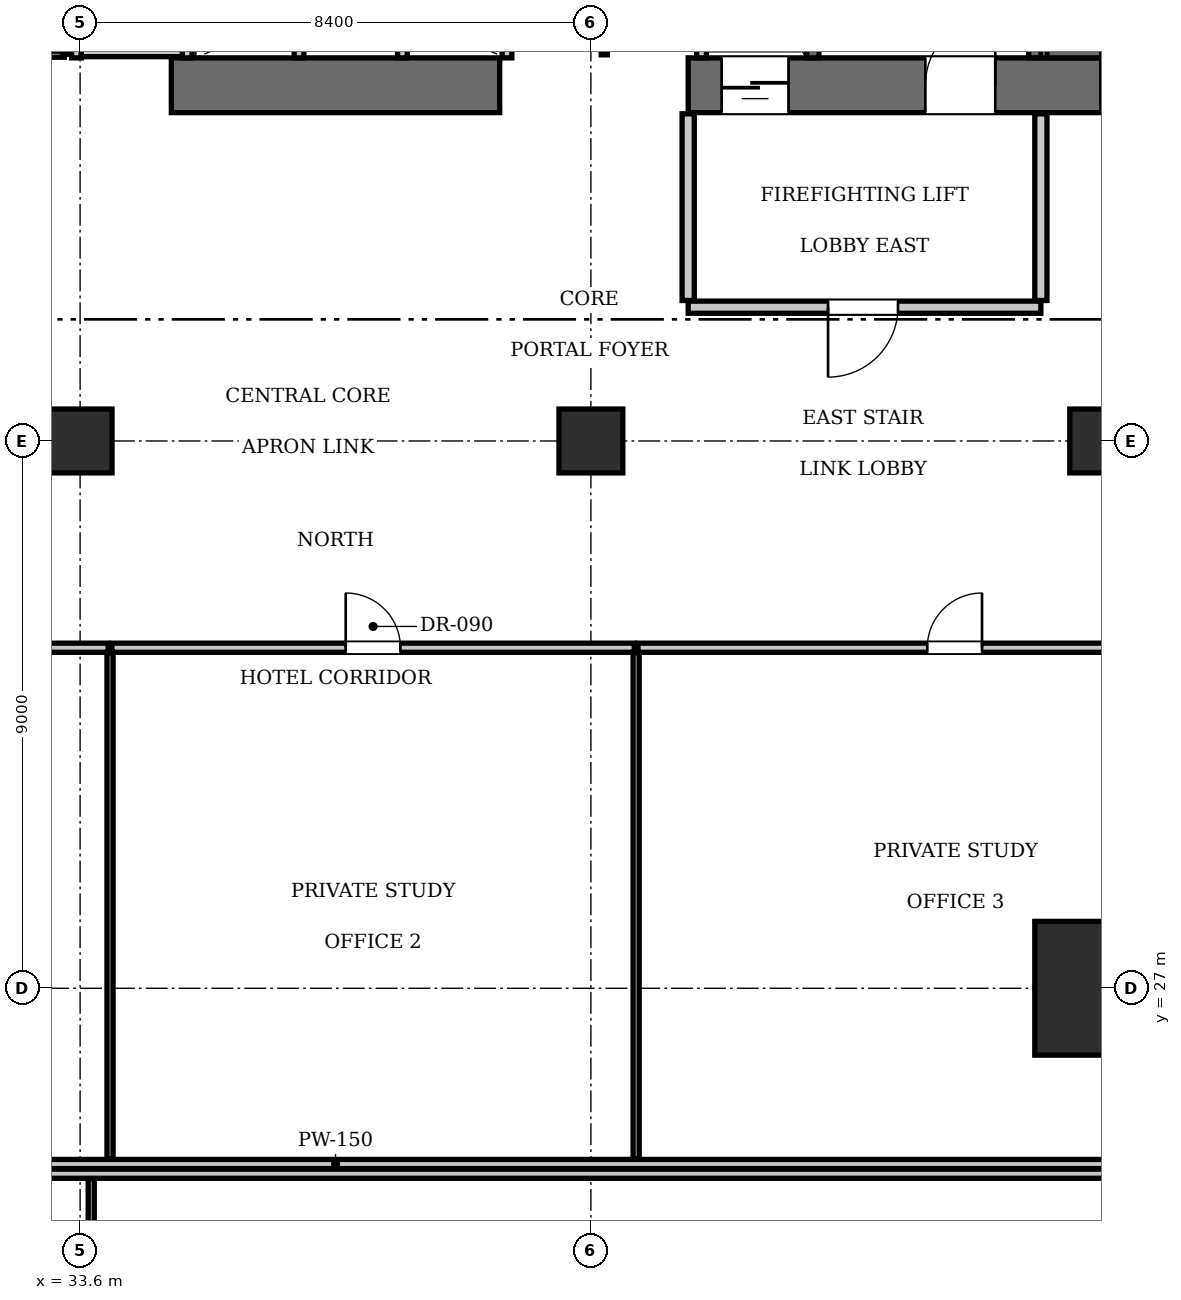
"""IFC4 building model, lengths in metres.
Left out: names, types, materials, properties, quantities, classifications, styles, units other than length and angle.
Written with IfcOpenShell. Run it as: python <this file> out.ifc"""

import sys

from ifc_helpers import new_model, si_unit, direction, frame, frame_2d, origin, origin_2d, place, context, subcontext, project, spatial, rectangle, extrude, element, fill, save


model = new_model("IFC4")
c1 = context("Model", 3, precision=1e-05, world=origin(), true_north=direction((0.0, 1.0)))
c2 = subcontext(c1, "Body", "Model", "MODEL_VIEW")
j1 = project(units=[si_unit("LENGTHUNIT", "METRE"), si_unit("PLANEANGLEUNIT", "RADIAN")], contexts=[c1])
p1 = place(None, origin())
s1 = spatial("IfcSite", under=j1, at=p1, CompositionType="ELEMENT")
p2 = place(p1, origin())
s2 = spatial("IfcBuilding", under=s1, at=p2, CompositionType="ELEMENT")
p3 = place(p2, frame((0.0, 0.0, 69.3)))
s3 = spatial("IfcBuildingStorey", under=s2, at=p3, CompositionType="ELEMENT", Elevation=69.3)
p4 = place(p3, frame((50.4, 27.0, 0.0), z_axis=(0.0, 0.0, 1.0), x_axis=(1.0, 0.0, 0.0)))
e1 = element("IfcColumn", 1, at=p4, inside=s3, PredefinedType="COLUMN", context=c2, shape_type="SweptSolid", body=[
    extrude(rectangle(XDim=2.2, YDim=2.2, at=origin_2d()), origin(), (0.0, 0.0, 1.0), 3.85),
])
p5 = place(p3, frame((35.1, 41.85, 0.0), z_axis=(0.0, 0.0, 1.0), x_axis=(1.0, 0.0, 0.0)))
e2 = element("IfcWall", 2, at=p5, inside=s3, PredefinedType="SHEAR", context=c2, shape_type="SweptSolid", body=[
    extrude(rectangle(XDim=5.4, YDim=0.9, at=frame_2d((2.7, 0.0))), origin(), (0.0, 0.0, 1.0), 3.85),
])
p6 = place(p3, frame((43.6, 41.85, 0.0), z_axis=(0.0, 0.0, 1.0), x_axis=(1.0, 0.0, 0.0)))
e3 = element("IfcWall", 3, at=p6, inside=s3, PredefinedType="SHEAR", context=c2, shape_type="SweptSolid", body=[
    extrude(rectangle(XDim=6.8, YDim=0.9, at=frame_2d((3.4, 0.0))), origin(), (0.0, 0.0, 1.0), 3.85),
])
p7 = place(p6, frame((3.9, 0.0, 0.0)))
e4 = element("IfcOpeningElement", 4, at=p7, cuts=e3, PredefinedType="OPENING", context=c2, shape_type="SweptSolid", body=[
    extrude(rectangle(XDim=1.15, YDim=2.15, at=frame_2d((0.575, 1.075))), frame((0.0, 0.46, 0.0), z_axis=(0.0, -1.0, 0.0), x_axis=(1.0, 0.0, 0.0)), (0.0, 0.0, 1.0), 0.92),
])
p8 = place(p6, frame((0.55, 0.0, 0.0)))
e5 = element("IfcOpeningElement", 5, at=p8, cuts=e3, PredefinedType="OPENING", context=c2, shape_type="SweptSolid", body=[
    extrude(rectangle(XDim=1.1, YDim=2.2, at=frame_2d((0.55, 1.1))), frame((0.0, 0.46, 0.0), z_axis=(0.0, -1.0, 0.0), x_axis=(1.0, 0.0, 0.0)), (0.0, 0.0, 1.0), 0.92),
])
p9 = place(p3, frame((49.95, 42.3, 0.0), z_axis=(0.0, 0.0, 1.0), x_axis=(0.0, 1.0, 0.0)))
e6 = element("IfcWall", 6, at=p9, inside=s3, PredefinedType="SHEAR", context=c2, shape_type="SweptSolid", body=[
    extrude(rectangle(XDim=1.6, YDim=0.9, at=frame_2d((0.8, 0.0))), origin(), (0.0, 0.0, 1.0), 3.85),
])
for number, where, z_axis, x_axis in (
    (7, (33.6, 36.0, 0.0), (0.0, 0.0, 1.0), (1.0, 0.0, 0.0)),
    (8, (42.0, 36.0, 0.0), (0.0, 0.0, 1.0), (1.0, 0.0, 0.0)),
    (9, (50.4, 36.0, 0.0), (0.0, 0.0, 1.0), (1.0, 0.0, 0.0)),
):
    element("IfcColumn", number, at=place(p3, frame(where, z_axis=z_axis, x_axis=x_axis)), inside=s3, PredefinedType="COLUMN", context=c2, shape_type="SweptSolid", body=[
        extrude(rectangle(XDim=1.05, YDim=1.05, at=origin_2d()), origin(), (0.0, 0.0, 1.0), 3.85),
    ])
p10 = place(p3, frame((45.65, 42.3, 0.0), z_axis=(0.0, 0.0, 1.0), x_axis=(0.0, 1.0, 0.0)))
e10 = element("IfcWall", 10, at=p10, inside=s3, PredefinedType="SOLIDWALL", context=c2, shape_type="SweptSolid", body=[
    extrude(rectangle(XDim=8.85, YDim=0.2, at=frame_2d((4.425, 0.0))), origin(), (0.0, 0.0, 1.0), 3.61),
])
p11 = place(p3, frame((49.3, 42.3, 0.0), z_axis=(0.0, 0.0, 1.0), x_axis=(0.0, 1.0, 0.0)))
e11 = element("IfcWall", 11, at=p11, inside=s3, PredefinedType="SOLIDWALL", context=c2, shape_type="SweptSolid", body=[
    extrude(rectangle(XDim=1.58, YDim=0.2, at=frame_2d((0.79, 0.0))), origin(), (0.0, 0.0, 1.0), 3.61),
])
p12 = place(p3, frame((43.82, 42.3, 0.0), z_axis=(0.0, 0.0, 1.0), x_axis=(0.0, 1.0, 0.0)))
e12 = element("IfcWall", 12, at=p12, inside=s3, PredefinedType="SOLIDWALL", context=c2, shape_type="SweptSolid", body=[
    extrude(rectangle(XDim=2.44, YDim=0.16, at=frame_2d((1.22, 0.0))), origin(), (0.0, 0.0, 1.0), 3.61),
])
for number, where, z_axis, x_axis in (
    (13, (37.2, 42.3, 0.0), (0.0, 0.0, 1.0), (0.0, 1.0, 0.0)),
    (14, (38.9, 42.3, 0.0), (0.0, 0.0, 1.0), (0.0, 1.0, 0.0)),
    (15, (40.62, 42.3, 0.0), (0.0, 0.0, 1.0), (0.0, 1.0, 0.0)),
):
    element("IfcWall", number, at=place(p3, frame(where, z_axis=z_axis, x_axis=x_axis)), inside=s3, PredefinedType="SOLIDWALL", context=c2, shape_type="SweptSolid", body=[
        extrude(rectangle(XDim=2.05, YDim=0.16, at=frame_2d((1.025, 0.0))), origin(), (0.0, 0.0, 1.0), 3.61),
    ])
for number, where, z_axis, x_axis in (
    (16, (33.54, 42.3, 0.0), (0.0, 0.0, 1.0), (0.0, 1.0, 0.0)),
    (17, (35.36, 42.3, 0.0), (0.0, 0.0, 1.0), (0.0, 1.0, 0.0)),
):
    element("IfcWall", number, at=place(p3, frame(where, z_axis=z_axis, x_axis=x_axis)), inside=s3, PredefinedType="SOLIDWALL", context=c2, shape_type="SweptSolid", body=[
        extrude(rectangle(XDim=2.1, YDim=0.16, at=frame_2d((1.05, 0.0))), origin(), (0.0, 0.0, 1.0), 3.61),
    ])
p13 = place(p3, frame((33.62, 42.4, 0.0), z_axis=(0.0, 0.0, 1.0), x_axis=(1.0, 0.0, 0.0)))
e18 = element("IfcWall", 18, at=p13, inside=s3, PredefinedType="SOLIDWALL", context=c2, shape_type="SweptSolid", body=[
    extrude(rectangle(XDim=1.66, YDim=0.16, at=frame_2d((0.83, 0.0))), origin(), (0.0, 0.0, 1.0), 3.61),
])
p14 = place(p3, frame((43.6, 38.2, 0.0), z_axis=(0.0, 0.0, 1.0), x_axis=(1.0, 0.0, 0.0)))
e19 = element("IfcWall", 19, at=p14, inside=s3, PredefinedType="PARTITIONING", context=c2, shape_type="SweptSolid", body=[
    extrude(rectangle(XDim=5.8, YDim=0.2, at=frame_2d((2.9, 0.0))), origin(), (0.0, 0.0, 1.0), 3.61),
])
p15 = place(p14, frame((2.3, 0.0, 0.0)))
e20 = element("IfcOpeningElement", 20, at=p15, cuts=e19, PredefinedType="OPENING", context=c2, shape_type="SweptSolid", body=[
    extrude(rectangle(XDim=1.15, YDim=2.15, at=frame_2d((0.575, 1.075))), frame((0.0, 0.11, 0.0), z_axis=(0.0, -1.0, 0.0), x_axis=(1.0, 0.0, 0.0)), (0.0, 0.0, 1.0), 0.22),
])
for number, where, z_axis, x_axis in (
    (21, (43.6, 38.31, 0.0), (0.0, 0.0, 1.0), (0.0, 1.0, 0.0)),
    (22, (49.4, 38.31, 0.0), (0.0, 0.0, 1.0), (0.0, 1.0, 0.0)),
):
    element("IfcWall", number, at=place(p3, frame(where, z_axis=z_axis, x_axis=x_axis)), inside=s3, PredefinedType="PARTITIONING", context=c2, shape_type="SweptSolid", body=[
        extrude(rectangle(XDim=3.07, YDim=0.2, at=frame_2d((1.535, 0.0))), origin(), (0.0, 0.0, 1.0), 3.61),
    ])
p16 = place(p3, frame((32.02, 42.36, 0.0), z_axis=(0.0, 0.0, 1.0), x_axis=(1.0, 0.0, 0.0)))
e23 = element("IfcWall", 23, at=p16, inside=s3, PredefinedType="PARTITIONING", context=c2, shape_type="SweptSolid", body=[
    extrude(rectangle(XDim=1.32, YDim=0.1, at=frame_2d((0.66, 0.0))), origin(), (0.0, 0.0, 1.0), 3.61),
])
p17 = place(p16, frame((0.24, 0.0, 0.0)))
e24 = element("IfcOpeningElement", 24, at=p17, cuts=e23, PredefinedType="OPENING", context=c2, shape_type="SweptSolid", body=[
    extrude(rectangle(XDim=0.8, YDim=2.05, at=frame_2d((0.4, 1.025))), frame((0.0, 0.06, 0.0), z_axis=(0.0, -1.0, 0.0), x_axis=(1.0, 0.0, 0.0)), (0.0, 0.0, 1.0), 0.12),
])
p18 = place(p3, frame((33.36, 42.36, 0.0), z_axis=(0.0, 0.0, 1.0), x_axis=(0.0, 1.0, 0.0)))
e25 = element("IfcWall", 25, at=p18, inside=s3, PredefinedType="PARTITIONING", context=c2, shape_type="SweptSolid", body=[
    extrude(rectangle(XDim=2.58, YDim=0.1, at=frame_2d((1.29, 0.0))), origin(), (0.0, 0.0, 1.0), 3.61),
])
p19 = place(p3, frame((42.22, 42.35, 0.0), z_axis=(0.0, 0.0, 1.0), x_axis=(0.0, 1.0, 0.0)))
e26 = element("IfcWall", 26, at=p19, inside=s3, PredefinedType="PARTITIONING", context=c2, shape_type="SweptSolid", body=[
    extrude(rectangle(XDim=2.61, YDim=0.1, at=frame_2d((1.305, 0.0))), origin(), (0.0, 0.0, 1.0), 3.61),
])
p20 = place(p19, frame((0.65, 0.0, 0.0)))
e27 = element("IfcOpeningElement", 27, at=p20, cuts=e26, PredefinedType="OPENING", context=c2, shape_type="SweptSolid", body=[
    extrude(rectangle(XDim=0.8, YDim=2.05, at=frame_2d((0.4, 1.025))), frame((0.0, 0.06, 0.0), z_axis=(0.0, -1.0, 0.0), x_axis=(1.0, 0.0, 0.0)), (0.0, 0.0, 1.0), 0.12),
])
p21 = place(p3, frame((22.35, 24.11, 0.0), z_axis=(0.0, 0.0, 1.0), x_axis=(1.0, 0.0, 0.0)))
e28 = element("IfcWall", 28, at=p21, inside=s3, PredefinedType="PARTITIONING", context=c2, shape_type="SweptSolid", body=[
    extrude(rectangle(XDim=30.9, YDim=0.15, at=frame_2d((15.45, 0.0))), origin(), (0.0, 0.0, 1.0), 3.61),
])
p22 = place(p3, frame((27.324, 32.6, 0.0), z_axis=(0.0, 0.0, 1.0), x_axis=(1.0, 0.0, 0.0)))
e29 = element("IfcWall", 29, at=p22, inside=s3, PredefinedType="PARTITIONING", context=c2, shape_type="SweptSolid", body=[
    extrude(rectangle(XDim=6.738, YDim=0.15, at=frame_2d((3.369, 0.0))), origin(), (0.0, 0.0, 1.0), 3.61),
])
p23 = place(p22, frame((2.919, 0.0, 0.0)))
e30 = element("IfcOpeningElement", 30, at=p23, cuts=e29, PredefinedType="OPENING", context=c2, shape_type="SweptSolid", body=[
    extrude(rectangle(XDim=0.9, YDim=2.1, at=frame_2d((0.45, 1.05))), frame((0.0, 0.085, 0.0), z_axis=(0.0, -1.0, 0.0), x_axis=(1.0, 0.0, 0.0)), (0.0, 0.0, 1.0), 0.17),
])
p24 = place(p3, frame((34.092, 24.19, 0.0), z_axis=(0.0, 0.0, 1.0), x_axis=(0.0, 1.0, 0.0)))
e31 = element("IfcWall", 31, at=p24, inside=s3, PredefinedType="PARTITIONING", context=c2, shape_type="SweptSolid", body=[
    extrude(rectangle(XDim=8.33, YDim=0.1, at=frame_2d((4.165, 0.0))), origin(), (0.0, 0.0, 1.0), 3.61),
])
p25 = place(p3, frame((34.122, 32.6, 0.0), z_axis=(0.0, 0.0, 1.0), x_axis=(1.0, 0.0, 0.0)))
e32 = element("IfcWall", 32, at=p25, inside=s3, PredefinedType="PARTITIONING", context=c2, shape_type="SweptSolid", body=[
    extrude(rectangle(XDim=8.592, YDim=0.15, at=frame_2d((4.296, 0.0))), origin(), (0.0, 0.0, 1.0), 3.61),
])
p26 = place(p25, frame((3.846, 0.0, 0.0)))
e33 = element("IfcOpeningElement", 33, at=p26, cuts=e32, PredefinedType="OPENING", context=c2, shape_type="SweptSolid", body=[
    extrude(rectangle(XDim=0.9, YDim=2.1, at=frame_2d((0.45, 1.05))), frame((0.0, 0.085, 0.0), z_axis=(0.0, -1.0, 0.0), x_axis=(1.0, 0.0, 0.0)), (0.0, 0.0, 1.0), 0.17),
])
p27 = place(p3, frame((42.744, 24.19, 0.0), z_axis=(0.0, 0.0, 1.0), x_axis=(0.0, 1.0, 0.0)))
e34 = element("IfcWall", 34, at=p27, inside=s3, PredefinedType="PARTITIONING", context=c2, shape_type="SweptSolid", body=[
    extrude(rectangle(XDim=8.33, YDim=0.1, at=frame_2d((4.165, 0.0))), origin(), (0.0, 0.0, 1.0), 3.61),
])
p28 = place(p3, frame((42.774, 32.6, 0.0), z_axis=(0.0, 0.0, 1.0), x_axis=(1.0, 0.0, 0.0)))
e35 = element("IfcWall", 35, at=p28, inside=s3, PredefinedType="PARTITIONING", context=c2, shape_type="SweptSolid", body=[
    extrude(rectangle(XDim=10.416, YDim=0.15, at=frame_2d((5.208, 0.0))), origin(), (0.0, 0.0, 1.0), 3.61),
])
p29 = place(p28, frame((4.758, 0.0, 0.0)))
e36 = element("IfcOpeningElement", 36, at=p29, cuts=e35, PredefinedType="OPENING", context=c2, shape_type="SweptSolid", body=[
    extrude(rectangle(XDim=0.9, YDim=2.1, at=frame_2d((0.45, 1.05))), frame((0.0, 0.085, 0.0), z_axis=(0.0, -1.0, 0.0), x_axis=(1.0, 0.0, 0.0)), (0.0, 0.0, 1.0), 0.17),
])
p30 = place(p3, frame((22.35, 23.95, 0.0), z_axis=(0.0, 0.0, 1.0), x_axis=(1.0, 0.0, 0.0)))
e37 = element("IfcWall", 37, at=p30, inside=s3, PredefinedType="PARTITIONING", context=c2, shape_type="SweptSolid", body=[
    extrude(rectangle(XDim=30.9, YDim=0.15, at=frame_2d((15.45, 0.0))), origin(), (0.0, 0.0, 1.0), 3.61),
])
p31 = place(p3, frame((33.783, 15.53, 0.0), z_axis=(0.0, 0.0, 1.0), x_axis=(0.0, 1.0, 0.0)))
e38 = element("IfcWall", 38, at=p31, inside=s3, PredefinedType="PARTITIONING", context=c2, shape_type="SweptSolid", body=[
    extrude(rectangle(XDim=8.34, YDim=0.1, at=frame_2d((4.17, 0.0))), origin(), (0.0, 0.0, 1.0), 2.988),
])
p32 = place(p7, origin())
e39 = element("IfcDoor", 39, at=p32, inside=s3, OperationType="SINGLE_SWING_RIGHT", PredefinedType="DOOR", context=c2, shape_type="SweptSolid", body=[
    extrude(rectangle(XDim=1.15, YDim=2.15, at=frame_2d((0.575, 1.075))), frame((0.0, 0.025, 0.0), z_axis=(0.0, -1.0, 0.0), x_axis=(1.0, 0.0, 0.0)), (0.0, 0.0, 1.0), 0.05),
])
fill(e4, e39)
p33 = place(p8, frame((1.1, 0.0, 0.0), z_axis=(0.0, 0.0, 1.0), x_axis=(-1.0, 0.0, 0.0)))
e40 = element("IfcDoor", 40, at=p33, inside=s3, OperationType="SLIDING_TO_LEFT", PredefinedType="DOOR", context=c2, shape_type="SweptSolid", body=[
    extrude(rectangle(XDim=1.1, YDim=2.2, at=frame_2d((0.55, 1.1))), frame((0.0, 0.025, 0.0), z_axis=(0.0, -1.0, 0.0), x_axis=(1.0, 0.0, 0.0)), (0.0, 0.0, 1.0), 0.05),
])
fill(e5, e40)
p34 = place(p15, frame((1.15, 0.0, 0.0), z_axis=(0.0, 0.0, 1.0), x_axis=(-1.0, 0.0, 0.0)))
e41 = element("IfcDoor", 41, at=p34, inside=s3, OperationType="SINGLE_SWING_RIGHT", PredefinedType="DOOR", context=c2, shape_type="SweptSolid", body=[
    extrude(rectangle(XDim=1.15, YDim=2.15, at=frame_2d((0.575, 1.075))), frame((0.0, 0.025, 0.0), z_axis=(0.0, -1.0, 0.0), x_axis=(1.0, 0.0, 0.0)), (0.0, 0.0, 1.0), 0.05),
])
fill(e20, e41)
p35 = place(p26, origin())
e42 = element("IfcDoor", 42, at=p35, inside=s3, OperationType="SINGLE_SWING_LEFT", PredefinedType="DOOR", context=c2, shape_type="SweptSolid", body=[
    extrude(rectangle(XDim=0.9, YDim=2.1, at=frame_2d((0.45, 1.05))), frame((0.0, 0.025, 0.0), z_axis=(0.0, -1.0, 0.0), x_axis=(1.0, 0.0, 0.0)), (0.0, 0.0, 1.0), 0.05),
])
fill(e33, e42)
p36 = place(p29, origin())
e43 = element("IfcDoor", 43, at=p36, inside=s3, OperationType="SINGLE_SWING_RIGHT", PredefinedType="DOOR", context=c2, shape_type="SweptSolid", body=[
    extrude(rectangle(XDim=0.9, YDim=2.1, at=frame_2d((0.45, 1.05))), frame((0.0, 0.025, 0.0), z_axis=(0.0, -1.0, 0.0), x_axis=(1.0, 0.0, 0.0)), (0.0, 0.0, 1.0), 0.05),
])
fill(e36, e43)
save(model, sys.argv[1])
